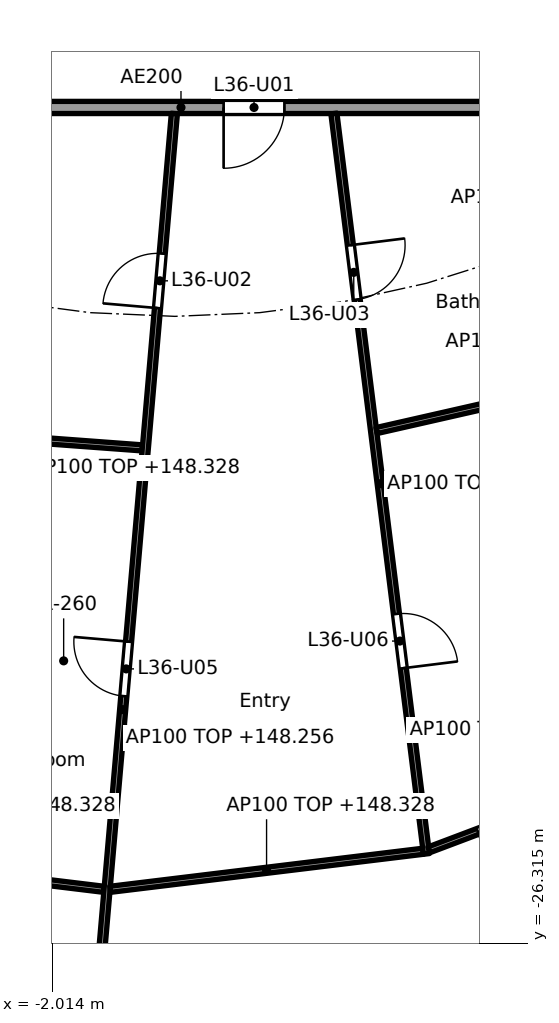
"""IFC4 building model, lengths in metres.
Left out: names, types, materials, properties, quantities, classifications, styles, units other than length and angle.
Written with IfcOpenShell. Run it as: python <this file> out.ifc"""

import sys

from ifc_helpers import new_model, si_unit, direction, frame, frame_2d, origin, place, context, subcontext, project, spatial, rectangle, extrude, element, fill, save


model = new_model("IFC4")
c1 = context("Model", 3, precision=1e-05, world=origin(), true_north=direction((0.0, 1.0)))
c2 = subcontext(c1, "Body", "Model", "MODEL_VIEW")
j1 = project(units=[si_unit("LENGTHUNIT", "METRE"), si_unit("PLANEANGLEUNIT", "RADIAN")], contexts=[c1])
p1 = place(None, origin())
s1 = spatial("IfcSite", under=j1, at=p1, CompositionType="ELEMENT")
p2 = place(p1, origin())
s2 = spatial("IfcBuilding", under=s1, at=p2, CompositionType="ELEMENT")
p3 = place(p2, frame((0.0, 0.0, 145.5)))
s3 = spatial("IfcBuildingStorey", under=s2, at=p3, CompositionType="ELEMENT", Elevation=145.5)
p4 = place(p3, frame((-5.104, -12.565, 0.0), z_axis=(0.0, 0.0, 1.0), x_axis=(1.0, 0.0, 0.0)))
e1 = element("IfcWall", 1, at=p4, inside=s3, PredefinedType="PARTITIONING", context=c2, shape_type="SweptSolid", body=[
    extrude(rectangle(XDim=10.409, YDim=0.2, at=frame_2d((5.205, 0.0))), origin(), (0.0, 0.0, 1.0), 3.44),
])
p5 = place(p4, frame((5.906, 0.0, 0.0)))
e2 = element("IfcOpeningElement", 2, at=p5, cuts=e1, PredefinedType="OPENING", context=c2, shape_type="SweptSolid", body=[
    extrude(rectangle(XDim=1.0, YDim=2.1, at=frame_2d((0.5, 1.05))), frame((0.0, 0.11, 0.0), z_axis=(0.0, -1.0, 0.0), x_axis=(1.0, 0.0, 0.0)), (0.0, 0.0, 1.0), 0.22),
])
p6 = place(p3, frame((-4.29, -17.885, 0.0), z_axis=(0.0, 0.0, 1.0), x_axis=(0.997272353708, -0.073809569363, 0.0)))
e3 = element("IfcWall", 3, at=p6, inside=s3, PredefinedType="PARTITIONING", context=c2, shape_type="SweptSolid", body=[
    extrude(rectangle(XDim=3.764, YDim=0.1, at=frame_2d((1.882, 0.0))), origin(), (0.0, 0.0, 1.0), 2.828),
])
p7 = place(p6, frame((0.541, 0.0, 0.0)))
e4 = element("IfcOpeningElement", 4, at=p7, cuts=e3, PredefinedType="OPENING", context=c2, shape_type="SweptSolid", body=[
    extrude(rectangle(XDim=0.9, YDim=2.1, at=frame_2d((0.45, 1.05))), frame((0.0, 0.06, 0.0), z_axis=(0.0, -1.0, 0.0), x_axis=(1.0, 0.0, 0.0)), (0.0, 0.0, 1.0), 0.12),
])
p8 = place(p3, frame((-6.313, -24.797, 0.0), z_axis=(0.0, 0.0, 1.0), x_axis=(0.992692993044, -0.120667400577, 0.0)))
e5 = element("IfcWall", 5, at=p8, inside=s3, PredefinedType="PARTITIONING", context=c2, shape_type="SweptSolid", body=[
    extrude(rectangle(XDim=5.186, YDim=0.1, at=frame_2d((2.593, 0.0))), origin(), (0.0, 0.0, 1.0), 2.828),
])
p9 = place(p3, frame((-0.009, -12.664, 0.0), z_axis=(0.0, 0.0, 1.0), x_axis=(-0.086431005932, -0.996257838721, 0.0)))
e6 = element("IfcWall", 6, at=p9, inside=s3, PredefinedType="PARTITIONING", context=c2, shape_type="SweptSolid", body=[
    extrude(rectangle(XDim=19.68, YDim=0.1, at=frame_2d((9.84, 0.0))), origin(), (0.0, 0.0, 1.0), 2.756),
])
p10 = place(p9, frame((2.312, 0.0, 0.0)))
e7 = element("IfcOpeningElement", 7, at=p10, cuts=e6, PredefinedType="OPENING", context=c2, shape_type="SweptSolid", body=[
    extrude(rectangle(XDim=0.9, YDim=2.1, at=frame_2d((0.45, 1.05))), frame((0.0, 0.06, 0.0), z_axis=(0.0, -1.0, 0.0), x_axis=(1.0, 0.0, 0.0)), (0.0, 0.0, 1.0), 0.12),
])
p11 = place(p9, frame((8.718, 0.0, 0.0)))
e8 = element("IfcOpeningElement", 8, at=p11, cuts=e6, PredefinedType="OPENING", context=c2, shape_type="SweptSolid", body=[
    extrude(rectangle(XDim=0.9, YDim=2.1, at=frame_2d((0.45, 1.05))), frame((0.0, 0.06, 0.0), z_axis=(0.0, -1.0, 0.0), x_axis=(1.0, 0.0, 0.0)), (0.0, 0.0, 1.0), 0.12),
])
p12 = place(p3, frame((-1.066, -25.422, 0.0), z_axis=(0.0, 0.0, 1.0), x_axis=(0.992692993044, 0.120667400577, 0.0)))
e9 = element("IfcWall", 9, at=p12, inside=s3, PredefinedType="PARTITIONING", context=c2, shape_type="SweptSolid", body=[
    extrude(rectangle(XDim=5.186, YDim=0.1, at=frame_2d((2.593, 0.0))), origin(), (0.0, 0.0, 1.0), 2.828),
])
p13 = place(p3, frame((2.615, -12.664, 0.0), z_axis=(0.0, 0.0, 1.0), x_axis=(0.124051875784, -0.992275733914, 0.0)))
e10 = element("IfcWall", 10, at=p13, inside=s3, PredefinedType="PARTITIONING", context=c2, shape_type="SweptSolid", body=[
    extrude(rectangle(XDim=12.271, YDim=0.1, at=frame_2d((6.135, 0.0))), origin(), (0.0, 0.0, 1.0), 2.756),
])
p14 = place(p13, frame((2.183, 0.0, 0.0)))
e11 = element("IfcOpeningElement", 11, at=p14, cuts=e10, PredefinedType="OPENING", context=c2, shape_type="SweptSolid", body=[
    extrude(rectangle(XDim=0.9, YDim=2.1, at=frame_2d((0.45, 1.05))), frame((0.0, 0.06, 0.0), z_axis=(0.0, -1.0, 0.0), x_axis=(1.0, 0.0, 0.0)), (0.0, 0.0, 1.0), 0.12),
])
p15 = place(p13, frame((8.293, 0.0, 0.0)))
e12 = element("IfcOpeningElement", 12, at=p15, cuts=e10, PredefinedType="OPENING", context=c2, shape_type="SweptSolid", body=[
    extrude(rectangle(XDim=0.9, YDim=2.1, at=frame_2d((0.45, 1.05))), frame((0.0, 0.06, 0.0), z_axis=(0.0, -1.0, 0.0), x_axis=(1.0, 0.0, 0.0)), (0.0, 0.0, 1.0), 0.12),
])
p16 = place(p3, frame((3.317, -17.878, 0.0), z_axis=(0.0, 0.0, 1.0), x_axis=(0.975099660451, 0.221767112505, 0.0)))
e13 = element("IfcWall", 13, at=p16, inside=s3, PredefinedType="PARTITIONING", context=c2, shape_type="SweptSolid", body=[
    extrude(rectangle(XDim=3.686, YDim=0.1, at=frame_2d((1.843, 0.0))), origin(), (0.0, 0.0, 1.0), 2.828),
])
p17 = place(p3, frame((4.178, -24.773, 0.0), z_axis=(0.0, 0.0, 1.0), x_axis=(0.935585145124, 0.353101169955, 0.0)))
e14 = element("IfcWall", 14, at=p17, inside=s3, PredefinedType="PARTITIONING", context=c2, shape_type="SweptSolid", body=[
    extrude(rectangle(XDim=5.233, YDim=0.1, at=frame_2d((2.617, 0.0))), origin(), (0.0, 0.0, 1.0), 2.828),
])
p18 = place(p17, frame((0.858, 0.0, 0.0)))
e15 = element("IfcOpeningElement", 15, at=p18, cuts=e14, PredefinedType="OPENING", context=c2, shape_type="SweptSolid", body=[
    extrude(rectangle(XDim=0.9, YDim=2.1, at=frame_2d((0.45, 1.05))), frame((0.0, 0.06, 0.0), z_axis=(0.0, -1.0, 0.0), x_axis=(1.0, 0.0, 0.0)), (0.0, 0.0, 1.0), 0.12),
])
p19 = place(p5, frame((1.0, 0.0, 0.0), x_axis=(-1.0, 0.0, 0.0)))
e16 = element("IfcDoor", 16, at=p19, inside=s3, OperationType="SINGLE_SWING_RIGHT", PredefinedType="DOOR", context=c2, shape_type="SweptSolid", body=[
    extrude(rectangle(XDim=1.0, YDim=2.1, at=frame_2d((0.5, 1.05))), frame((0.0, 0.025, 0.0), z_axis=(0.0, -1.0, 0.0), x_axis=(1.0, 0.0, 0.0)), (0.0, 0.0, 1.0), 0.05),
])
fill(e2, e16)
p20 = place(p10, frame((0.9, 0.0, 0.0), x_axis=(-1.0, 0.0, 0.0)))
e17 = element("IfcDoor", 17, at=p20, inside=s3, OperationType="SINGLE_SWING_LEFT", PredefinedType="DOOR", context=c2, shape_type="SweptSolid", body=[
    extrude(rectangle(XDim=0.9, YDim=2.1, at=frame_2d((0.45, 1.05))), frame((0.0, 0.025, 0.0), z_axis=(0.0, -1.0, 0.0), x_axis=(1.0, 0.0, 0.0)), (0.0, 0.0, 1.0), 0.05),
])
fill(e7, e17)
p21 = place(p14, origin())
e18 = element("IfcDoor", 18, at=p21, inside=s3, OperationType="SINGLE_SWING_LEFT", PredefinedType="DOOR", context=c2, shape_type="SweptSolid", body=[
    extrude(rectangle(XDim=0.9, YDim=2.1, at=frame_2d((0.45, 1.05))), frame((0.0, 0.025, 0.0), z_axis=(0.0, -1.0, 0.0), x_axis=(1.0, 0.0, 0.0)), (0.0, 0.0, 1.0), 0.05),
])
fill(e11, e18)
p22 = place(p11, frame((0.9, 0.0, 0.0), x_axis=(-1.0, 0.0, 0.0)))
e19 = element("IfcDoor", 19, at=p22, inside=s3, OperationType="SINGLE_SWING_RIGHT", PredefinedType="DOOR", context=c2, shape_type="SweptSolid", body=[
    extrude(rectangle(XDim=0.9, YDim=2.1, at=frame_2d((0.45, 1.05))), frame((0.0, 0.025, 0.0), z_axis=(0.0, -1.0, 0.0), x_axis=(1.0, 0.0, 0.0)), (0.0, 0.0, 1.0), 0.05),
])
fill(e8, e19)
p23 = place(p15, origin())
e20 = element("IfcDoor", 20, at=p23, inside=s3, OperationType="SINGLE_SWING_RIGHT", PredefinedType="DOOR", context=c2, shape_type="SweptSolid", body=[
    extrude(rectangle(XDim=0.9, YDim=2.1, at=frame_2d((0.45, 1.05))), frame((0.0, 0.025, 0.0), z_axis=(0.0, -1.0, 0.0), x_axis=(1.0, 0.0, 0.0)), (0.0, 0.0, 1.0), 0.05),
])
fill(e12, e20)
p24 = place(p18, frame((0.9, 0.0, 0.0), x_axis=(-1.0, 0.0, 0.0)))
e21 = element("IfcDoor", 21, at=p24, inside=s3, OperationType="SINGLE_SWING_RIGHT", PredefinedType="DOOR", context=c2, shape_type="SweptSolid", body=[
    extrude(rectangle(XDim=0.9, YDim=2.1, at=frame_2d((0.45, 1.05))), frame((0.0, 0.025, 0.0), z_axis=(0.0, -1.0, 0.0), x_axis=(1.0, 0.0, 0.0)), (0.0, 0.0, 1.0), 0.05),
])
fill(e15, e21)
save(model, sys.argv[1])
